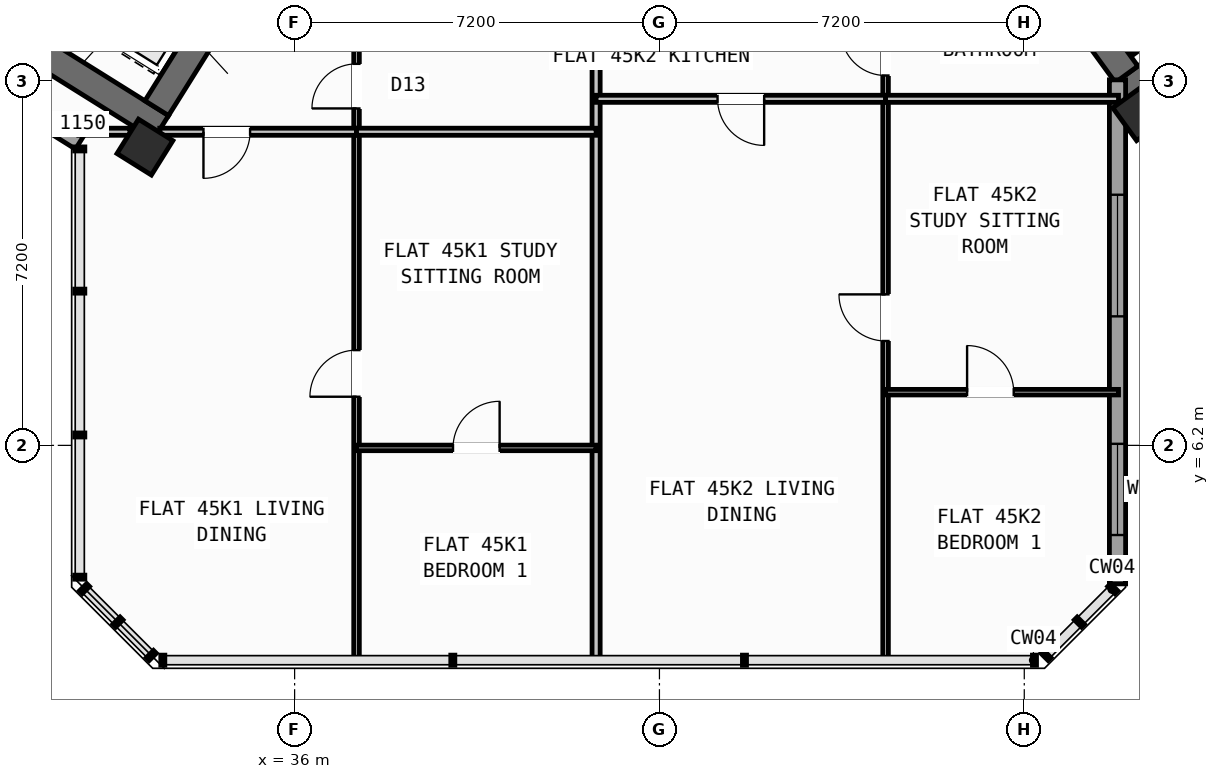
"""IFC4 building model, lengths in metres.
Left out: names, types, materials, properties, quantities, classifications, styles, units other than length and angle.
Written with IfcOpenShell. Run it as: python <this file> out.ifc"""

import sys

from ifc_helpers import new_model, si_unit, direction, frame, frame_2d, origin, origin_2d, place, context, subcontext, project, spatial, rectangle, hollow_rectangle, extrude, source, transform, mapped, element, fill, save


model = new_model("IFC4")
c1 = context("Model", 3, precision=1e-05, world=origin(), true_north=direction((0.0, 1.0)))
c2 = subcontext(c1, "Body", "Model", "MODEL_VIEW")
j1 = project(units=[si_unit("LENGTHUNIT", "METRE"), si_unit("PLANEANGLEUNIT", "RADIAN")], contexts=[c1])
p1 = place(None, origin())
s1 = spatial("IfcSite", under=j1, at=p1, CompositionType="ELEMENT")
p2 = place(p1, origin())
s2 = spatial("IfcBuilding", under=s1, at=p2, CompositionType="ELEMENT")
p3 = place(p2, frame((0.0, 0.0, 179.4)))
s3 = spatial("IfcBuildingStorey", under=s2, at=p3, CompositionType="ELEMENT", Elevation=179.4)
p4 = place(p3, frame((33.366, 12.477, 0.0), z_axis=(0.0, 0.0, 1.0), x_axis=(-0.848047359947, 0.529920442413, 0.0)))
e1 = element("IfcWall", 1, at=p4, inside=s3, PredefinedType="SHEAR", context=c2, shape_type="SweptSolid", body=[
    extrude(rectangle(XDim=13.14, YDim=0.55, at=frame_2d((6.57, 0.0))), origin(), (0.0, 0.0, 1.0), 4.55),
])
p5 = place(p3, frame((36.683, 18.304, 0.0), z_axis=(0.0, 0.0, 1.0), x_axis=(-0.529896466841, -0.848062341122, 0.0)))
e2 = element("IfcWall", 2, at=p5, inside=s3, PredefinedType="SHEAR", context=c2, shape_type="SweptSolid", body=[
    extrude(rectangle(XDim=6.425, YDim=0.55, at=frame_2d((3.212, 0.0))), origin(), (0.0, 0.0, 1.0), 4.55),
])
p6 = place(p3, frame((52.359, 13.14, 0.0), z_axis=(0.0, 0.0, 1.0), x_axis=(0.809014896919, 0.587788139183, 0.0)))
e3 = element("IfcWall", 3, at=p6, inside=s3, PredefinedType="SHEAR", context=c2, shape_type="SweptSolid", body=[
    extrude(rectangle(XDim=12.34, YDim=0.55, at=frame_2d((6.17, 0.0))), origin(), (0.0, 0.0, 1.0), 4.55),
])
p7 = place(p3, frame((52.42, 13.524, 0.0), z_axis=(0.0, 0.0, 1.0), x_axis=(-0.587802113096, 0.809004744015, 0.0)))
e4 = element("IfcWall", 4, at=p7, inside=s3, PredefinedType="SHEAR", context=c2, shape_type="SweptSolid", body=[
    extrude(rectangle(XDim=3.575, YDim=0.55, at=frame_2d((1.788, 0.0))), origin(), (0.0, 0.0, 1.0), 4.55),
])
m1 = source(origin(), c2, "Body", "SweptSolid", [
    extrude(hollow_rectangle(XDim=0.8, YDim=0.8, WallThickness=0.032, at=origin_2d()), origin(), (0.0, 0.0, 1.0), 4.8),
])
for number, where, z_axis, x_axis in (
    (5, (33.046, 12.087, 0.0), (0.0, 0.0, 1.0), (-0.848, 0.53, 0.0)),
    (6, (52.705, 12.773, 0.0), (0.0, 0.0, 1.0), (0.809, 0.588, 0.0)),
):
    element("IfcColumn", number, at=place(p3, frame(where, z_axis=z_axis, x_axis=x_axis)), inside=s3, PredefinedType="COLUMN", context=c2, shape_type="MappedRepresentation", body=[
        mapped(m1, transform((0.0, 0.0, 0.0), scale=1.0)),
    ])
p8 = place(p3, frame((31.76, 12.183, 0.0), z_axis=(0.0, 0.0, 1.0), x_axis=(-0.848047074256, 0.529920899612, 0.0)))
e7 = element("IfcWall", 7, at=p8, inside=s3, PredefinedType="STANDARD", context=c2, shape_type="SweptSolid", body=[
    extrude(rectangle(XDim=30.652, YDim=0.32, at=frame_2d((15.326, 0.0))), origin(), (0.0, 0.0, 1.0), 4.55),
])
p9 = place(p8, frame((21.52, 0.0, 0.0)))
e8 = element("IfcOpeningElement", 8, at=p9, cuts=e7, PredefinedType="OPENING", context=c2, shape_type="SweptSolid", body=[
    extrude(rectangle(XDim=1.2, YDim=2.15, at=frame_2d((0.6, 1.075))), frame((0.0, 0.17, 0.0), z_axis=(0.0, -1.0, 0.0), x_axis=(1.0, 0.0, 0.0)), (0.0, 0.0, 1.0), 0.34),
])
p10 = place(p8, frame((14.878, 0.0, 0.0)))
e9 = element("IfcOpeningElement", 9, at=p10, cuts=e7, PredefinedType="OPENING", context=c2, shape_type="SweptSolid", body=[
    extrude(rectangle(XDim=1.5, YDim=2.25, at=frame_2d((0.75, 1.125))), frame((0.0, 0.17, 0.0), z_axis=(0.0, -1.0, 0.0), x_axis=(1.0, 0.0, 0.0)), (0.0, 0.0, 1.0), 0.34),
])
p11 = place(p8, frame((1.865, 0.0, 0.75)))
e10 = element("IfcOpeningElement", 10, at=p11, cuts=e7, PredefinedType="OPENING", context=c2, shape_type="SweptSolid", body=[
    extrude(rectangle(XDim=2.4, YDim=1.6, at=frame_2d((1.2, 0.8))), frame((0.0, 0.17, 0.0), z_axis=(0.0, -1.0, 0.0), x_axis=(1.0, 0.0, 0.0)), (0.0, 0.0, 1.0), 0.34),
])
p12 = place(p8, frame((7.094, 0.0, 0.75)))
e11 = element("IfcOpeningElement", 11, at=p12, cuts=e7, PredefinedType="OPENING", context=c2, shape_type="SweptSolid", body=[
    extrude(rectangle(XDim=2.4, YDim=1.6, at=frame_2d((1.2, 0.8))), frame((0.0, 0.17, 0.0), z_axis=(0.0, -1.0, 0.0), x_axis=(1.0, 0.0, 0.0)), (0.0, 0.0, 1.0), 0.34),
])
p13 = place(p8, frame((19.404, 0.0, 0.95)))
e12 = element("IfcOpeningElement", 12, at=p13, cuts=e7, PredefinedType="OPENING", context=c2, shape_type="SweptSolid", body=[
    extrude(rectangle(XDim=1.2, YDim=1.4, at=frame_2d((0.6, 0.7))), frame((0.0, 0.17, 0.0), z_axis=(0.0, -1.0, 0.0), x_axis=(1.0, 0.0, 0.0)), (0.0, 0.0, 1.0), 0.34),
])
p14 = place(p8, frame((26.458, 0.0, 0.75)))
e13 = element("IfcOpeningElement", 13, at=p14, cuts=e7, PredefinedType="OPENING", context=c2, shape_type="SweptSolid", body=[
    extrude(rectangle(XDim=2.4, YDim=1.6, at=frame_2d((1.2, 0.8))), frame((0.0, 0.17, 0.0), z_axis=(0.0, -1.0, 0.0), x_axis=(1.0, 0.0, 0.0)), (0.0, 0.0, 1.0), 0.34),
])
p15 = place(p3, frame((52.24, 13.414, 0.0), z_axis=(0.0, 0.0, 1.0), x_axis=(0.0, -1.0, 0.0)))
e14 = element("IfcWall", 14, at=p15, inside=s3, PredefinedType="STANDARD", context=c2, shape_type="SweptSolid", body=[
    extrude(rectangle(XDim=9.948, YDim=0.32, at=frame_2d((4.974, 0.0))), origin(), (0.0, 0.0, 1.0), 4.55),
])
p16 = place(p15, frame((2.268, 0.0, 0.75)))
e15 = element("IfcOpeningElement", 15, at=p16, cuts=e14, PredefinedType="OPENING", context=c2, shape_type="SweptSolid", body=[
    extrude(rectangle(XDim=2.4, YDim=1.6, at=frame_2d((1.2, 0.8))), frame((0.0, 0.17, 0.0), z_axis=(0.0, -1.0, 0.0), x_axis=(1.0, 0.0, 0.0)), (0.0, 0.0, 1.0), 0.34),
])
p17 = place(p15, frame((7.183, 0.0, 0.85)))
e16 = element("IfcOpeningElement", 16, at=p17, cuts=e14, PredefinedType="OPENING", context=c2, shape_type="SweptSolid", body=[
    extrude(rectangle(XDim=1.8, YDim=1.5, at=frame_2d((0.9, 0.75))), frame((0.0, 0.17, 0.0), z_axis=(0.0, -1.0, 0.0), x_axis=(1.0, 0.0, 0.0)), (0.0, 0.0, 1.0), 0.34),
])
p18 = place(p3, frame((52.472, 14.013, 0.0), z_axis=(0.0, 0.0, 1.0), x_axis=(0.809028366311, 0.587769599847, 0.0)))
e17 = element("IfcWall", 17, at=p18, inside=s3, PredefinedType="SHEAR", context=c2, shape_type="SweptSolid", body=[
    extrude(rectangle(XDim=7.33, YDim=0.26, at=frame_2d((3.665, 0.0))), origin(), (0.0, 0.0, 1.0), 4.55),
])
p19 = place(p3, frame((41.95, 1.96, 0.0), z_axis=(0.0, 0.0, 1.0), x_axis=(0.0, 1.0, 0.0)))
e18 = element("IfcWall", 18, at=p19, inside=s3, PredefinedType="PARTITIONING", context=c2, shape_type="SweptSolid", body=[
    extrude(rectangle(XDim=13.46, YDim=0.16, at=frame_2d((6.73, 0.0))), origin(), (0.0, 0.0, 1.0), 4.54),
])
p20 = place(p3, frame((37.222, 1.96, 0.0), z_axis=(0.0, 0.0, 1.0), x_axis=(0.0, 1.0, 0.0)))
e19 = element("IfcWall", 19, at=p20, inside=s3, PredefinedType="PARTITIONING", context=c2, shape_type="SweptSolid", body=[
    extrude(rectangle(XDim=13.46, YDim=0.11, at=frame_2d((6.73, 0.0))), origin(), (0.0, 0.0, 1.0), 4.54),
])
p21 = place(p20, frame((5.2, 0.0, 0.0)))
e20 = element("IfcOpeningElement", 20, at=p21, cuts=e19, PredefinedType="OPENING", context=c2, shape_type="SweptSolid", body=[
    extrude(rectangle(XDim=0.92, YDim=2.08, at=frame_2d((0.46, 1.04))), frame((0.0, 0.065, 0.0), z_axis=(0.0, -1.0, 0.0), x_axis=(1.0, 0.0, 0.0)), (0.0, 0.0, 1.0), 0.13),
])
p22 = place(p20, frame((10.89, 0.0, 0.0)))
e21 = element("IfcOpeningElement", 21, at=p22, cuts=e19, PredefinedType="OPENING", context=c2, shape_type="SweptSolid", body=[
    extrude(rectangle(XDim=0.88, YDim=2.08, at=frame_2d((0.44, 1.04))), frame((0.0, 0.065, 0.0), z_axis=(0.0, -1.0, 0.0), x_axis=(1.0, 0.0, 0.0)), (0.0, 0.0, 1.0), 0.13),
])
p23 = place(p3, frame((31.74, 12.39, 0.0), z_axis=(0.0, 0.0, 1.0), x_axis=(1.0, 0.0, 0.0)))
e22 = element("IfcWall", 22, at=p23, inside=s3, PredefinedType="PLUMBINGWALL", context=c2, shape_type="SweptSolid", body=[
    extrude(rectangle(XDim=1.01, YDim=0.14, at=frame_2d((0.505, 0.0))), origin(), (0.0, 0.0, 1.0), 4.54),
])
p24 = place(p3, frame((33.339, 12.39, 0.0), z_axis=(0.0, 0.0, 1.0), x_axis=(1.0, 0.0, 0.0)))
e23 = element("IfcWall", 23, at=p24, inside=s3, PredefinedType="PLUMBINGWALL", context=c2, shape_type="SweptSolid", body=[
    extrude(rectangle(XDim=3.883, YDim=0.14, at=frame_2d((1.942, 0.0))), origin(), (0.0, 0.0, 1.0), 3.725),
])
p25 = place(p24, frame((0.863, 0.0, 0.0)))
e24 = element("IfcOpeningElement", 24, at=p25, cuts=e23, PredefinedType="OPENING", context=c2, shape_type="SweptSolid", body=[
    extrude(rectangle(XDim=0.92, YDim=2.08, at=frame_2d((0.46, 1.04))), frame((0.0, 0.08, 0.0), z_axis=(0.0, -1.0, 0.0), x_axis=(1.0, 0.0, 0.0)), (0.0, 0.0, 1.0), 0.16),
])
p26 = place(p3, frame((37.222, 12.39, 0.0), z_axis=(0.0, 0.0, 1.0), x_axis=(1.0, 0.0, 0.0)))
e25 = element("IfcWall", 25, at=p26, inside=s3, PredefinedType="PLUMBINGWALL", context=c2, shape_type="SweptSolid", body=[
    extrude(rectangle(XDim=4.728, YDim=0.14, at=frame_2d((2.364, 0.0))), origin(), (0.0, 0.0, 1.0), 3.725),
])
p27 = place(p3, frame((37.222, 6.15, 0.0), z_axis=(0.0, 0.0, 1.0), x_axis=(1.0, 0.0, 0.0)))
e26 = element("IfcWall", 26, at=p27, inside=s3, PredefinedType="PARTITIONING", context=c2, shape_type="SweptSolid", body=[
    extrude(rectangle(XDim=4.728, YDim=0.11, at=frame_2d((2.364, 0.0))), origin(), (0.0, 0.0, 1.0), 4.54),
])
p28 = place(p27, frame((1.904, 0.0, 0.0)))
e27 = element("IfcOpeningElement", 27, at=p28, cuts=e26, PredefinedType="OPENING", context=c2, shape_type="SweptSolid", body=[
    extrude(rectangle(XDim=0.92, YDim=2.08, at=frame_2d((0.46, 1.04))), frame((0.0, 0.065, 0.0), z_axis=(0.0, -1.0, 0.0), x_axis=(1.0, 0.0, 0.0)), (0.0, 0.0, 1.0), 0.13),
])
p29 = place(p3, frame((47.663, 1.96, 0.0), z_axis=(0.0, 0.0, 1.0), x_axis=(0.0, 1.0, 0.0)))
e28 = element("IfcWall", 28, at=p29, inside=s3, PredefinedType="PARTITIONING", context=c2, shape_type="SweptSolid", body=[
    extrude(rectangle(XDim=13.46, YDim=0.11, at=frame_2d((6.73, 0.0))), origin(), (0.0, 0.0, 1.0), 4.54),
])
p30 = place(p29, frame((6.3, 0.0, 0.0)))
e29 = element("IfcOpeningElement", 29, at=p30, cuts=e28, PredefinedType="OPENING", context=c2, shape_type="SweptSolid", body=[
    extrude(rectangle(XDim=0.92, YDim=2.08, at=frame_2d((0.46, 1.04))), frame((0.0, 0.065, 0.0), z_axis=(0.0, -1.0, 0.0), x_axis=(1.0, 0.0, 0.0)), (0.0, 0.0, 1.0), 0.13),
])
p31 = place(p29, frame((11.54, 0.0, 0.0)))
e30 = element("IfcOpeningElement", 30, at=p31, cuts=e28, PredefinedType="OPENING", context=c2, shape_type="SweptSolid", body=[
    extrude(rectangle(XDim=0.88, YDim=2.08, at=frame_2d((0.44, 1.04))), frame((0.0, 0.065, 0.0), z_axis=(0.0, -1.0, 0.0), x_axis=(1.0, 0.0, 0.0)), (0.0, 0.0, 1.0), 0.13),
])
p32 = place(p3, frame((41.95, 13.04, 0.0), z_axis=(0.0, 0.0, 1.0), x_axis=(1.0, 0.0, 0.0)))
e31 = element("IfcWall", 31, at=p32, inside=s3, PredefinedType="PLUMBINGWALL", context=c2, shape_type="SweptSolid", body=[
    extrude(rectangle(XDim=5.713, YDim=0.14, at=frame_2d((2.856, 0.0))), origin(), (0.0, 0.0, 1.0), 4.54),
])
p33 = place(p32, frame((2.396, 0.0, 0.0)))
e32 = element("IfcOpeningElement", 32, at=p33, cuts=e31, PredefinedType="OPENING", context=c2, shape_type="SweptSolid", body=[
    extrude(rectangle(XDim=0.92, YDim=2.08, at=frame_2d((0.46, 1.04))), frame((0.0, 0.08, 0.0), z_axis=(0.0, -1.0, 0.0), x_axis=(1.0, 0.0, 0.0)), (0.0, 0.0, 1.0), 0.16),
])
p34 = place(p3, frame((47.663, 13.04, 0.0), z_axis=(0.0, 0.0, 1.0), x_axis=(1.0, 0.0, 0.0)))
e33 = element("IfcWall", 33, at=p34, inside=s3, PredefinedType="PLUMBINGWALL", context=c2, shape_type="SweptSolid", body=[
    extrude(rectangle(XDim=4.597, YDim=0.14, at=frame_2d((2.298, 0.0))), origin(), (0.0, 0.0, 1.0), 3.725),
])
p35 = place(p3, frame((47.663, 7.25, 0.0), z_axis=(0.0, 0.0, 1.0), x_axis=(1.0, 0.0, 0.0)))
e34 = element("IfcWall", 34, at=p35, inside=s3, PredefinedType="PARTITIONING", context=c2, shape_type="SweptSolid", body=[
    extrude(rectangle(XDim=4.597, YDim=0.11, at=frame_2d((2.298, 0.0))), origin(), (0.0, 0.0, 1.0), 4.54),
])
p36 = place(p35, frame((1.608, 0.0, 0.0)))
e35 = element("IfcOpeningElement", 35, at=p36, cuts=e34, PredefinedType="OPENING", context=c2, shape_type="SweptSolid", body=[
    extrude(rectangle(XDim=0.92, YDim=2.08, at=frame_2d((0.46, 1.04))), frame((0.0, 0.065, 0.0), z_axis=(0.0, -1.0, 0.0), x_axis=(1.0, 0.0, 0.0)), (0.0, 0.0, 1.0), 0.13),
])
m2 = source(origin(), c2, "Body", "SweptSolid", [
    extrude(rectangle(XDim=2.4, YDim=1.6, at=frame_2d((1.2, 0.8))), frame((0.0, 0.03, 0.0), z_axis=(0.0, -1.0, 0.0), x_axis=(1.0, 0.0, 0.0)), (0.0, 0.0, 1.0), 0.06),
])
p37 = place(p16, origin())
e36 = element("IfcWindow", 36, at=p37, inside=s3, PartitioningType="SINGLE_PANEL", PredefinedType="WINDOW", context=c2, shape_type="MappedRepresentation", body=[
    mapped(m2, transform((0.0, 0.0, 0.0), scale=1.0)),
])
fill(e15, e36)
m3 = source(origin(), c2, "Body", "SweptSolid", [
    extrude(rectangle(XDim=1.8, YDim=1.5, at=frame_2d((0.9, 0.75))), frame((0.0, 0.03, 0.0), z_axis=(0.0, -1.0, 0.0), x_axis=(1.0, 0.0, 0.0)), (0.0, 0.0, 1.0), 0.06),
])
p38 = place(p17, origin())
e37 = element("IfcWindow", 37, at=p38, inside=s3, PartitioningType="SINGLE_PANEL", PredefinedType="WINDOW", context=c2, shape_type="MappedRepresentation", body=[
    mapped(m3, transform((0.0, 0.0, 0.0), scale=1.0)),
])
fill(e16, e37)
m4 = source(origin(), c2, "Body", "SweptSolid", [
    extrude(rectangle(XDim=0.92, YDim=2.08, at=frame_2d((0.46, 1.04))), frame((0.0, 0.025, 0.0), z_axis=(0.0, -1.0, 0.0), x_axis=(1.0, 0.0, 0.0)), (0.0, 0.0, 1.0), 0.05),
])
p39 = place(p21, origin())
e38 = element("IfcDoor", 38, at=p39, inside=s3, OperationType="SINGLE_SWING_LEFT", PredefinedType="DOOR", context=c2, shape_type="MappedRepresentation", body=[
    mapped(m4, transform((0.0, 0.0, 0.0), scale=1.0)),
])
fill(e20, e38)
p40 = place(p28, origin())
e39 = element("IfcDoor", 39, at=p40, inside=s3, OperationType="SINGLE_SWING_RIGHT", PredefinedType="DOOR", context=c2, shape_type="MappedRepresentation", body=[
    mapped(m4, transform((0.0, 0.0, 0.0), scale=1.0)),
])
fill(e27, e39)
p41 = place(p25, frame((0.92, 0.0, 0.0), z_axis=(0.0, 0.0, 1.0), x_axis=(-1.0, 0.0, 0.0)))
e40 = element("IfcDoor", 40, at=p41, inside=s3, OperationType="SINGLE_SWING_RIGHT", PredefinedType="DOOR", context=c2, shape_type="MappedRepresentation", body=[
    mapped(m4, transform((0.0, 0.0, 0.0), scale=1.0)),
])
fill(e24, e40)
m5 = source(origin(), c2, "Body", "SweptSolid", [
    extrude(rectangle(XDim=0.88, YDim=2.08, at=frame_2d((0.44, 1.04))), frame((0.0, 0.025, 0.0), z_axis=(0.0, -1.0, 0.0), x_axis=(1.0, 0.0, 0.0)), (0.0, 0.0, 1.0), 0.05),
])
p42 = place(p22, origin())
e41 = element("IfcDoor", 41, at=p42, inside=s3, OperationType="SINGLE_SWING_LEFT", PredefinedType="DOOR", context=c2, shape_type="MappedRepresentation", body=[
    mapped(m5, transform((0.0, 0.0, 0.0), scale=1.0)),
])
fill(e21, e41)
p43 = place(p30, origin())
e42 = element("IfcDoor", 42, at=p43, inside=s3, OperationType="SINGLE_SWING_RIGHT", PredefinedType="DOOR", context=c2, shape_type="MappedRepresentation", body=[
    mapped(m4, transform((0.0, 0.0, 0.0), scale=1.0)),
])
fill(e29, e42)
p44 = place(p36, origin())
e43 = element("IfcDoor", 43, at=p44, inside=s3, OperationType="SINGLE_SWING_LEFT", PredefinedType="DOOR", context=c2, shape_type="MappedRepresentation", body=[
    mapped(m4, transform((0.0, 0.0, 0.0), scale=1.0)),
])
fill(e35, e43)
p45 = place(p33, frame((0.92, 0.0, 0.0), z_axis=(0.0, 0.0, 1.0), x_axis=(-1.0, 0.0, 0.0)))
e44 = element("IfcDoor", 44, at=p45, inside=s3, OperationType="SINGLE_SWING_LEFT", PredefinedType="DOOR", context=c2, shape_type="MappedRepresentation", body=[
    mapped(m4, transform((0.0, 0.0, 0.0), scale=1.0)),
])
fill(e32, e44)
p46 = place(p31, origin())
e45 = element("IfcDoor", 45, at=p46, inside=s3, OperationType="SINGLE_SWING_RIGHT", PredefinedType="DOOR", context=c2, shape_type="MappedRepresentation", body=[
    mapped(m5, transform((0.0, 0.0, 0.0), scale=1.0)),
])
fill(e30, e45)
save(model, sys.argv[1])
